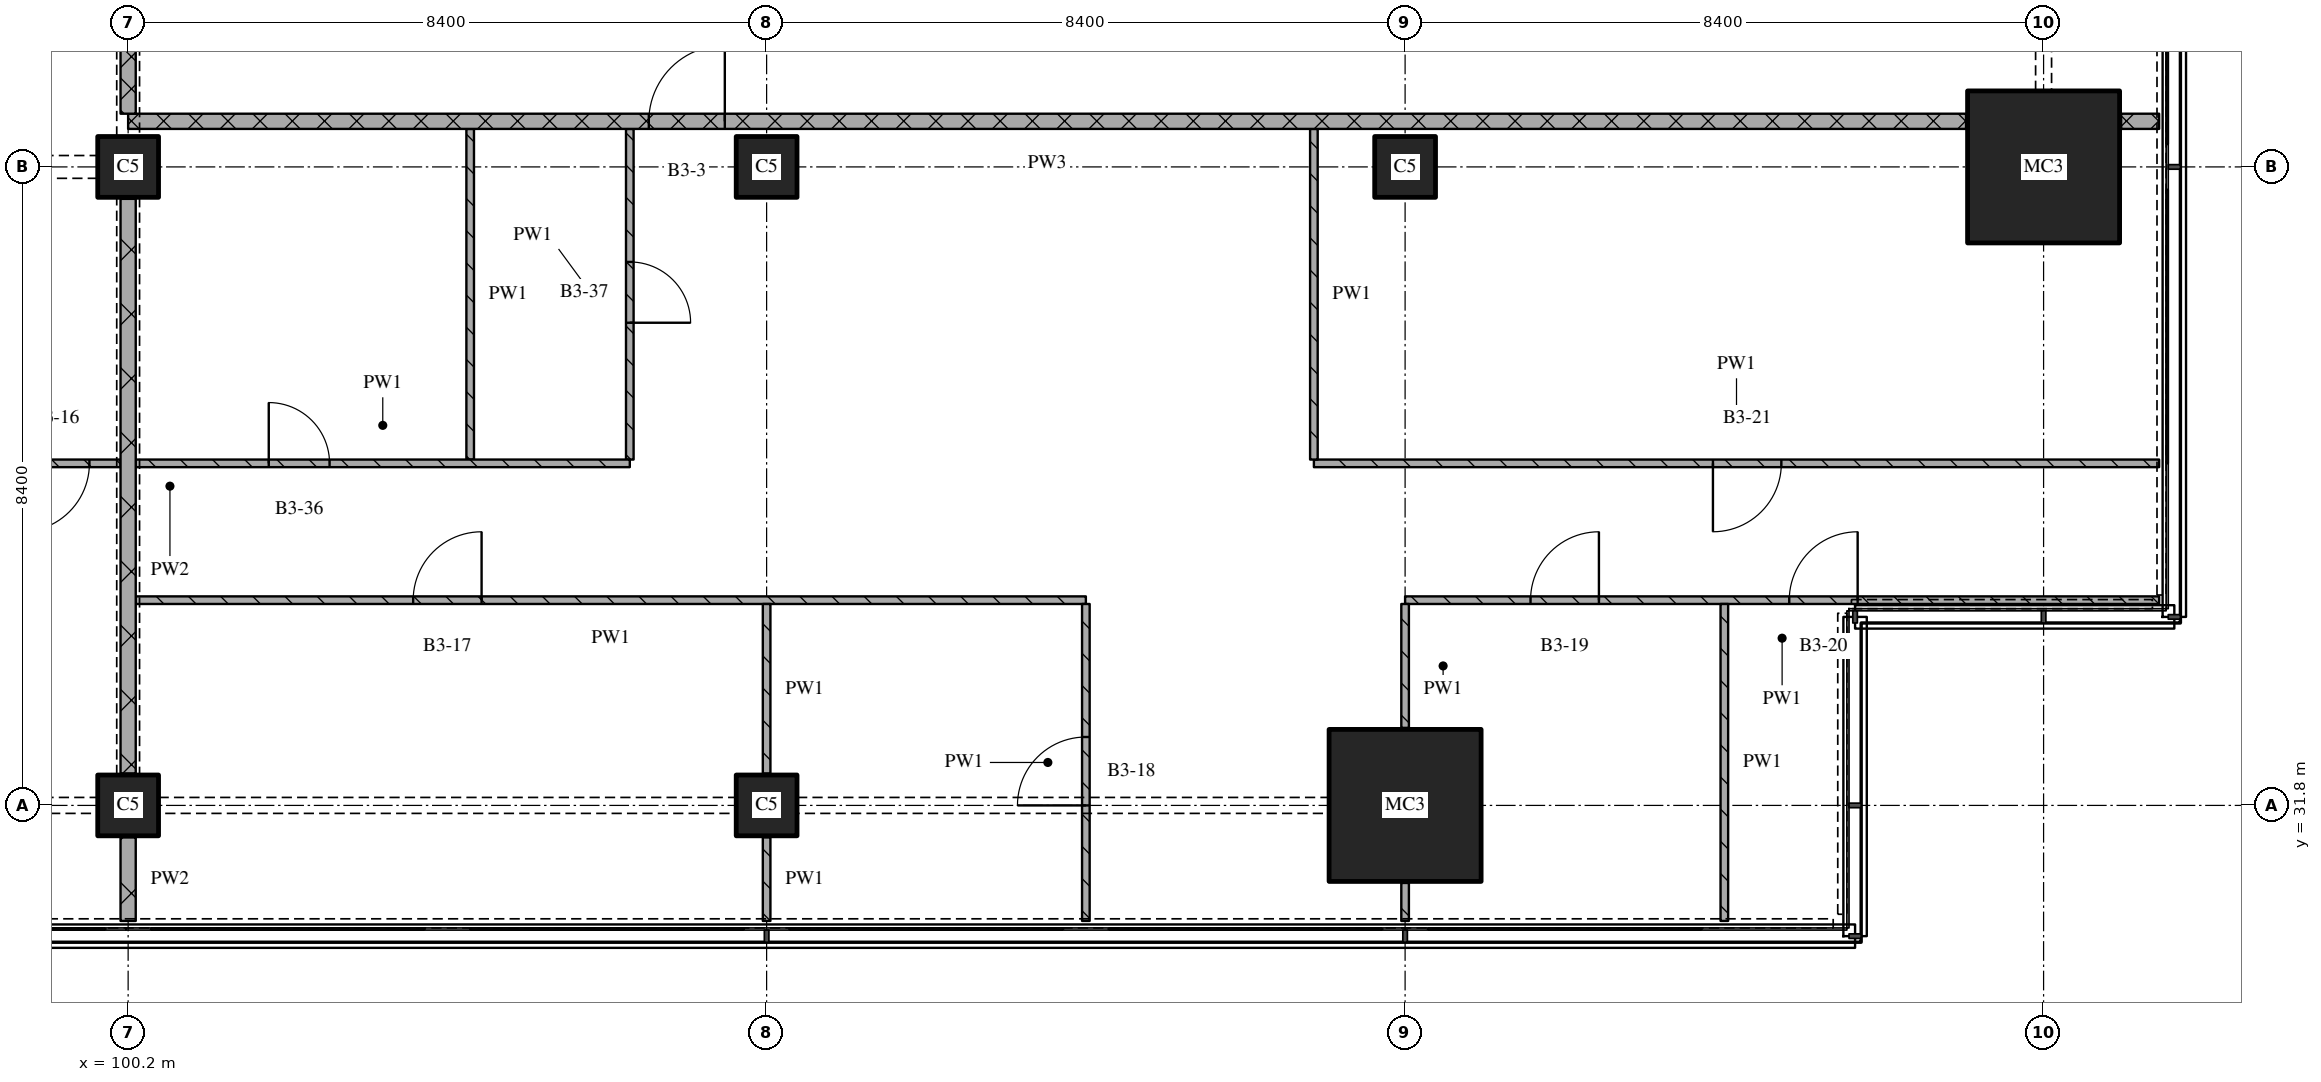
"""IFC4 building model, lengths in metres.
Left out: names, types, materials, properties, quantities, classifications, styles, units other than length and angle.
Written with IfcOpenShell. Run it as: python <this file> out.ifc"""

import sys

from ifc_helpers import new_model, si_unit, direction, frame, frame_2d, origin, origin_2d, place, context, subcontext, project, spatial, rectangle, extrude, element, fill, save


model = new_model("IFC4")
c1 = context("Model", 3, precision=1e-05, world=origin(), true_north=direction((0.0, 1.0)))
c2 = subcontext(c1, "Body", "Model", "MODEL_VIEW")
j1 = project(units=[si_unit("LENGTHUNIT", "METRE"), si_unit("PLANEANGLEUNIT", "RADIAN")], contexts=[c1])
p1 = place(None, origin())
s1 = spatial("IfcSite", under=j1, at=p1, CompositionType="ELEMENT")
p2 = place(p1, origin())
s2 = spatial("IfcBuilding", under=s1, at=p2, CompositionType="ELEMENT")
p3 = place(p2, frame((0.0, 0.0, 124.05)))
s3 = spatial("IfcBuildingStorey", under=s2, at=p3, CompositionType="ELEMENT", Elevation=124.05)
for number, where, z_axis, x_axis in (
    (1, (100.2, 31.8, 0.0), (0.0, 0.0, 1.0), (1.0, 0.0, 0.0)),
    (2, (100.2, 40.2, 0.0), (0.0, 0.0, 1.0), (1.0, 0.0, 0.0)),
    (3, (108.6, 31.8, 0.0), (0.0, 0.0, 1.0), (1.0, 0.0, 0.0)),
    (4, (108.6, 40.2, 0.0), (0.0, 0.0, 1.0), (1.0, 0.0, 0.0)),
):
    element("IfcColumn", number, at=place(p3, frame(where, z_axis=z_axis, x_axis=x_axis)), inside=s3, PredefinedType="COLUMN", context=c2, shape_type="SweptSolid", body=[
        extrude(rectangle(XDim=0.8, YDim=0.8, at=origin_2d()), origin(), (0.0, 0.0, 1.0), 3.6),
    ])
p4 = place(p3, frame((117.0, 31.8, 0.0), z_axis=(0.0, 0.0, 1.0), x_axis=(1.0, 0.0, 0.0)))
e5 = element("IfcColumn", 5, at=p4, inside=s3, PredefinedType="COLUMN", context=c2, shape_type="SweptSolid", body=[
    extrude(rectangle(XDim=2.0, YDim=2.0, at=origin_2d()), origin(), (0.0, 0.0, 1.0), 3.6),
])
p5 = place(p3, frame((117.0, 40.2, 0.0), z_axis=(0.0, 0.0, 1.0), x_axis=(1.0, 0.0, 0.0)))
e6 = element("IfcColumn", 6, at=p5, inside=s3, PredefinedType="COLUMN", context=c2, shape_type="SweptSolid", body=[
    extrude(rectangle(XDim=0.8, YDim=0.8, at=origin_2d()), origin(), (0.0, 0.0, 1.0), 3.6),
])
p6 = place(p3, frame((125.4, 40.2, 0.0), z_axis=(0.0, 0.0, 1.0), x_axis=(1.0, 0.0, 0.0)))
e7 = element("IfcColumn", 7, at=p6, inside=s3, PredefinedType="COLUMN", context=c2, shape_type="SweptSolid", body=[
    extrude(rectangle(XDim=2.0, YDim=2.0, at=origin_2d()), origin(), (0.0, 0.0, 1.0), 3.6),
])
p7 = place(p3, frame((112.8, 34.5, 0.0), z_axis=(0.0, 0.0, 1.0), x_axis=(-1.0, 0.0, 0.0)))
e8 = element("IfcWall", 8, at=p7, inside=s3, PredefinedType="PARTITIONING", context=c2, shape_type="SweptSolid", body=[
    extrude(rectangle(XDim=12.5, YDim=0.1, at=frame_2d((6.25, 0.0))), origin(), (0.0, 0.0, 1.0), 3.32),
])
p8 = place(p7, frame((7.95, 0.0, 0.0)))
e9 = element("IfcOpeningElement", 9, at=p8, cuts=e8, PredefinedType="OPENING", context=c2, shape_type="SweptSolid", body=[
    extrude(rectangle(XDim=0.9, YDim=2.1, at=frame_2d((0.45, 1.05))), frame((0.0, 0.06, 0.0), z_axis=(0.0, -1.0, 0.0), x_axis=(1.0, 0.0, 0.0)), (0.0, 0.0, 1.0), 0.12),
])
p9 = place(p3, frame((126.92, 34.5, 0.0), z_axis=(0.0, 0.0, 1.0), x_axis=(-1.0, 0.0, 0.0)))
e10 = element("IfcWall", 10, at=p9, inside=s3, PredefinedType="PARTITIONING", context=c2, shape_type="SweptSolid", body=[
    extrude(rectangle(XDim=9.92, YDim=0.1, at=frame_2d((4.96, 0.0))), origin(), (0.0, 0.0, 1.0), 3.32),
])
p10 = place(p9, frame((3.966, 0.0, 0.0)))
e11 = element("IfcOpeningElement", 11, at=p10, cuts=e10, PredefinedType="OPENING", context=c2, shape_type="SweptSolid", body=[
    extrude(rectangle(XDim=0.9, YDim=2.1, at=frame_2d((0.45, 1.05))), frame((0.0, 0.06, 0.0), z_axis=(0.0, -1.0, 0.0), x_axis=(1.0, 0.0, 0.0)), (0.0, 0.0, 1.0), 0.12),
])
p11 = place(p9, frame((7.37, 0.0, 0.0)))
e12 = element("IfcOpeningElement", 12, at=p11, cuts=e10, PredefinedType="OPENING", context=c2, shape_type="SweptSolid", body=[
    extrude(rectangle(XDim=0.9, YDim=2.1, at=frame_2d((0.45, 1.05))), frame((0.0, 0.06, 0.0), z_axis=(0.0, -1.0, 0.0), x_axis=(1.0, 0.0, 0.0)), (0.0, 0.0, 1.0), 0.12),
])
p12 = place(p3, frame((115.8, 36.3, 0.0), z_axis=(0.0, 0.0, 1.0), x_axis=(1.0, 0.0, 0.0)))
e13 = element("IfcWall", 13, at=p12, inside=s3, PredefinedType="PARTITIONING", context=c2, shape_type="SweptSolid", body=[
    extrude(rectangle(XDim=11.12, YDim=0.1, at=frame_2d((5.56, 0.0))), origin(), (0.0, 0.0, 1.0), 3.32),
])
p13 = place(p12, frame((5.25, 0.0, 0.0)))
e14 = element("IfcOpeningElement", 14, at=p13, cuts=e13, PredefinedType="OPENING", context=c2, shape_type="SweptSolid", body=[
    extrude(rectangle(XDim=0.9, YDim=2.1, at=frame_2d((0.45, 1.05))), frame((0.0, 0.06, 0.0), z_axis=(0.0, -1.0, 0.0), x_axis=(1.0, 0.0, 0.0)), (0.0, 0.0, 1.0), 0.12),
])
p14 = place(p3, frame((124.38, 40.8, 0.0), z_axis=(0.0, 0.0, 1.0), x_axis=(-1.0, 0.0, 0.0)))
e15 = element("IfcWall", 15, at=p14, inside=s3, PredefinedType="PARTITIONING", context=c2, shape_type="SweptSolid", body=[
    extrude(rectangle(XDim=24.18, YDim=0.2, at=frame_2d((12.09, 0.0))), origin(), (0.0, 0.0, 1.0), 3.32),
])
p15 = place(p14, frame((16.33, 0.0, 0.0)))
e16 = element("IfcOpeningElement", 16, at=p15, cuts=e15, PredefinedType="OPENING", context=c2, shape_type="SweptSolid", body=[
    extrude(rectangle(XDim=1.0, YDim=2.1, at=frame_2d((0.5, 1.05))), frame((0.0, 0.11, 0.0), z_axis=(0.0, -1.0, 0.0), x_axis=(1.0, 0.0, 0.0)), (0.0, 0.0, 1.0), 0.22),
])
p16 = place(p3, frame((126.42, 40.8, 0.0), z_axis=(0.0, 0.0, 1.0), x_axis=(1.0, 0.0, 0.0)))
e17 = element("IfcWall", 17, at=p16, inside=s3, PredefinedType="PARTITIONING", context=c2, shape_type="SweptSolid", body=[
    extrude(rectangle(XDim=0.5, YDim=0.2, at=frame_2d((0.25, 0.0))), origin(), (0.0, 0.0, 1.0), 3.32),
])
p17 = place(p3, frame((100.2, 43.1, 0.0), z_axis=(0.0, 0.0, 1.0), x_axis=(0.0, -1.0, 0.0)))
e18 = element("IfcWall", 18, at=p17, inside=s3, PredefinedType="PARTITIONING", context=c2, shape_type="SweptSolid", body=[
    extrude(rectangle(XDim=2.2, YDim=0.2, at=frame_2d((1.1, 0.0))), origin(), (0.0, 0.0, 1.0), 2.43),
])
p18 = place(p3, frame((100.2, 31.38, 0.0), z_axis=(0.0, 0.0, 1.0), x_axis=(0.0, -1.0, 0.0)))
e19 = element("IfcWall", 19, at=p18, inside=s3, PredefinedType="PARTITIONING", context=c2, shape_type="SweptSolid", body=[
    extrude(rectangle(XDim=1.1, YDim=0.2, at=frame_2d((0.55, 0.0))), origin(), (0.0, 0.0, 1.0), 3.32),
])
p19 = place(p3, frame((100.2, 39.78, 0.0), z_axis=(0.0, 0.0, 1.0), x_axis=(0.0, -1.0, 0.0)))
e20 = element("IfcWall", 20, at=p19, inside=s3, PredefinedType="PARTITIONING", context=c2, shape_type="SweptSolid", body=[
    extrude(rectangle(XDim=7.56, YDim=0.2, at=frame_2d((3.78, 0.0))), origin(), (0.0, 0.0, 1.0), 2.83),
])
p20 = place(p3, frame((104.7, 40.7, 0.0), z_axis=(0.0, 0.0, 1.0), x_axis=(0.0, -1.0, 0.0)))
e21 = element("IfcWall", 21, at=p20, inside=s3, PredefinedType="PARTITIONING", context=c2, shape_type="SweptSolid", body=[
    extrude(rectangle(XDim=4.35, YDim=0.1, at=frame_2d((2.175, 0.0))), origin(), (0.0, 0.0, 1.0), 3.32),
])
p21 = place(p3, frame((106.8, 36.35, 0.0), z_axis=(0.0, 0.0, 1.0), x_axis=(0.0, 1.0, 0.0)))
e22 = element("IfcWall", 22, at=p21, inside=s3, PredefinedType="PARTITIONING", context=c2, shape_type="SweptSolid", body=[
    extrude(rectangle(XDim=4.35, YDim=0.1, at=frame_2d((2.175, 0.0))), origin(), (0.0, 0.0, 1.0), 3.32),
])
p22 = place(p21, frame((1.8, 0.0, 0.0)))
e23 = element("IfcOpeningElement", 23, at=p22, cuts=e22, PredefinedType="OPENING", context=c2, shape_type="SweptSolid", body=[
    extrude(rectangle(XDim=0.8, YDim=2.1, at=frame_2d((0.4, 1.05))), frame((0.0, 0.06, 0.0), z_axis=(0.0, -1.0, 0.0), x_axis=(1.0, 0.0, 0.0)), (0.0, 0.0, 1.0), 0.12),
])
p23 = place(p3, frame((108.6, 31.38, 0.0), z_axis=(0.0, 0.0, 1.0), x_axis=(0.0, -1.0, 0.0)))
e24 = element("IfcWall", 24, at=p23, inside=s3, PredefinedType="PARTITIONING", context=c2, shape_type="SweptSolid", body=[
    extrude(rectangle(XDim=1.1, YDim=0.1, at=frame_2d((0.55, 0.0))), origin(), (0.0, 0.0, 1.0), 3.32),
])
p24 = place(p3, frame((108.6, 34.45, 0.0), z_axis=(0.0, 0.0, 1.0), x_axis=(0.0, -1.0, 0.0)))
e25 = element("IfcWall", 25, at=p24, inside=s3, PredefinedType="PARTITIONING", context=c2, shape_type="SweptSolid", body=[
    extrude(rectangle(XDim=2.23, YDim=0.1, at=frame_2d((1.115, 0.0))), origin(), (0.0, 0.0, 1.0), 3.32),
])
p25 = place(p3, frame((112.8, 30.28, 0.0), z_axis=(0.0, 0.0, 1.0), x_axis=(0.0, 1.0, 0.0)))
e26 = element("IfcWall", 26, at=p25, inside=s3, PredefinedType="PARTITIONING", context=c2, shape_type="SweptSolid", body=[
    extrude(rectangle(XDim=4.17, YDim=0.1, at=frame_2d((2.085, 0.0))), origin(), (0.0, 0.0, 1.0), 3.32),
])
p26 = place(p25, frame((1.52, 0.0, 0.0)))
e27 = element("IfcOpeningElement", 27, at=p26, cuts=e26, PredefinedType="OPENING", context=c2, shape_type="SweptSolid", body=[
    extrude(rectangle(XDim=0.9, YDim=2.1, at=frame_2d((0.45, 1.05))), frame((0.0, 0.06, 0.0), z_axis=(0.0, -1.0, 0.0), x_axis=(1.0, 0.0, 0.0)), (0.0, 0.0, 1.0), 0.12),
])
p27 = place(p3, frame((115.8, 40.7, 0.0), z_axis=(0.0, 0.0, 1.0), x_axis=(0.0, -1.0, 0.0)))
e28 = element("IfcWall", 28, at=p27, inside=s3, PredefinedType="PARTITIONING", context=c2, shape_type="SweptSolid", body=[
    extrude(rectangle(XDim=4.35, YDim=0.1, at=frame_2d((2.175, 0.0))), origin(), (0.0, 0.0, 1.0), 3.32),
])
p28 = place(p3, frame((117.0, 30.78, 0.0), z_axis=(0.0, 0.0, 1.0), x_axis=(0.0, -1.0, 0.0)))
e29 = element("IfcWall", 29, at=p28, inside=s3, PredefinedType="PARTITIONING", context=c2, shape_type="SweptSolid", body=[
    extrude(rectangle(XDim=0.5, YDim=0.1, at=frame_2d((0.25, 0.0))), origin(), (0.0, 0.0, 1.0), 3.32),
])
p29 = place(p3, frame((117.0, 34.45, 0.0), z_axis=(0.0, 0.0, 1.0), x_axis=(0.0, -1.0, 0.0)))
e30 = element("IfcWall", 30, at=p29, inside=s3, PredefinedType="PARTITIONING", context=c2, shape_type="SweptSolid", body=[
    extrude(rectangle(XDim=1.63, YDim=0.1, at=frame_2d((0.815, 0.0))), origin(), (0.0, 0.0, 1.0), 3.32),
])
p30 = place(p3, frame((121.2, 34.45, 0.0), z_axis=(0.0, 0.0, 1.0), x_axis=(0.0, -1.0, 0.0)))
e31 = element("IfcWall", 31, at=p30, inside=s3, PredefinedType="PARTITIONING", context=c2, shape_type="SweptSolid", body=[
    extrude(rectangle(XDim=4.17, YDim=0.1, at=frame_2d((2.085, 0.0))), origin(), (0.0, 0.0, 1.0), 3.32),
])
p31 = place(p3, frame((90.6, 36.3, 0.0), z_axis=(0.0, 0.0, 1.0), x_axis=(1.0, 0.0, 0.0)))
e32 = element("IfcWall", 32, at=p31, inside=s3, PredefinedType="PARTITIONING", context=c2, shape_type="SweptSolid", body=[
    extrude(rectangle(XDim=9.5, YDim=0.1, at=frame_2d((4.75, 0.0))), origin(), (0.0, 0.0, 1.0), 3.32),
])
p32 = place(p31, frame((5.361, 0.0, 0.0)))
e33 = element("IfcOpeningElement", 33, at=p32, cuts=e32, PredefinedType="OPENING", context=c2, shape_type="SweptSolid", body=[
    extrude(rectangle(XDim=0.8, YDim=2.1, at=frame_2d((0.4, 1.05))), frame((0.0, 0.06, 0.0), z_axis=(0.0, -1.0, 0.0), x_axis=(1.0, 0.0, 0.0)), (0.0, 0.0, 1.0), 0.12),
])
p33 = place(p31, frame((8.191, 0.0, 0.0)))
e34 = element("IfcOpeningElement", 34, at=p33, cuts=e32, PredefinedType="OPENING", context=c2, shape_type="SweptSolid", body=[
    extrude(rectangle(XDim=0.9, YDim=2.1, at=frame_2d((0.45, 1.05))), frame((0.0, 0.06, 0.0), z_axis=(0.0, -1.0, 0.0), x_axis=(1.0, 0.0, 0.0)), (0.0, 0.0, 1.0), 0.12),
])
p34 = place(p3, frame((100.3, 36.3, 0.0), z_axis=(0.0, 0.0, 1.0), x_axis=(1.0, 0.0, 0.0)))
e35 = element("IfcWall", 35, at=p34, inside=s3, PredefinedType="PARTITIONING", context=c2, shape_type="SweptSolid", body=[
    extrude(rectangle(XDim=6.5, YDim=0.1, at=frame_2d((3.25, 0.0))), origin(), (0.0, 0.0, 1.0), 3.32),
])
p35 = place(p34, frame((1.75, 0.0, 0.0)))
e36 = element("IfcOpeningElement", 36, at=p35, cuts=e35, PredefinedType="OPENING", context=c2, shape_type="SweptSolid", body=[
    extrude(rectangle(XDim=0.8, YDim=2.1, at=frame_2d((0.4, 1.05))), frame((0.0, 0.06, 0.0), z_axis=(0.0, -1.0, 0.0), x_axis=(1.0, 0.0, 0.0)), (0.0, 0.0, 1.0), 0.12),
])
p36 = place(p8, origin())
e37 = element("IfcDoor", 37, at=p36, inside=s3, OperationType="SINGLE_SWING_RIGHT", PredefinedType="DOOR", context=c2, shape_type="SweptSolid", body=[
    extrude(rectangle(XDim=0.9, YDim=2.1, at=frame_2d((0.45, 1.05))), frame((0.0, 0.025, 0.0), z_axis=(0.0, -1.0, 0.0), x_axis=(1.0, 0.0, 0.0)), (0.0, 0.0, 1.0), 0.05),
])
fill(e9, e37)
p37 = place(p10, origin())
e38 = element("IfcDoor", 38, at=p37, inside=s3, OperationType="SINGLE_SWING_RIGHT", PredefinedType="DOOR", context=c2, shape_type="SweptSolid", body=[
    extrude(rectangle(XDim=0.9, YDim=2.1, at=frame_2d((0.45, 1.05))), frame((0.0, 0.025, 0.0), z_axis=(0.0, -1.0, 0.0), x_axis=(1.0, 0.0, 0.0)), (0.0, 0.0, 1.0), 0.05),
])
fill(e11, e38)
p38 = place(p11, origin())
e39 = element("IfcDoor", 39, at=p38, inside=s3, OperationType="SINGLE_SWING_RIGHT", PredefinedType="DOOR", context=c2, shape_type="SweptSolid", body=[
    extrude(rectangle(XDim=0.9, YDim=2.1, at=frame_2d((0.45, 1.05))), frame((0.0, 0.025, 0.0), z_axis=(0.0, -1.0, 0.0), x_axis=(1.0, 0.0, 0.0)), (0.0, 0.0, 1.0), 0.05),
])
fill(e12, e39)
p39 = place(p13, origin())
e40 = element("IfcDoor", 40, at=p39, inside=s3, OperationType="SINGLE_SWING_RIGHT", PredefinedType="DOOR", context=c2, shape_type="SweptSolid", body=[
    extrude(rectangle(XDim=0.9, YDim=2.1, at=frame_2d((0.45, 1.05))), frame((0.0, 0.025, 0.0), z_axis=(0.0, -1.0, 0.0), x_axis=(1.0, 0.0, 0.0)), (0.0, 0.0, 1.0), 0.05),
])
fill(e14, e40)
p40 = place(p15, origin())
e41 = element("IfcDoor", 41, at=p40, inside=s3, OperationType="SINGLE_SWING_RIGHT", PredefinedType="DOOR", context=c2, shape_type="SweptSolid", body=[
    extrude(rectangle(XDim=1.0, YDim=2.1, at=frame_2d((0.5, 1.05))), frame((0.0, 0.025, 0.0), z_axis=(0.0, -1.0, 0.0), x_axis=(1.0, 0.0, 0.0)), (0.0, 0.0, 1.0), 0.05),
])
fill(e16, e41)
p41 = place(p22, origin())
e42 = element("IfcDoor", 42, at=p41, inside=s3, OperationType="SINGLE_SWING_RIGHT", PredefinedType="DOOR", context=c2, shape_type="SweptSolid", body=[
    extrude(rectangle(XDim=0.8, YDim=2.1, at=frame_2d((0.4, 1.05))), frame((0.0, 0.025, 0.0), z_axis=(0.0, -1.0, 0.0), x_axis=(1.0, 0.0, 0.0)), (0.0, 0.0, 1.0), 0.05),
])
fill(e23, e42)
p42 = place(p26, origin())
e43 = element("IfcDoor", 43, at=p42, inside=s3, OperationType="SINGLE_SWING_LEFT", PredefinedType="DOOR", context=c2, shape_type="SweptSolid", body=[
    extrude(rectangle(XDim=0.9, YDim=2.1, at=frame_2d((0.45, 1.05))), frame((0.0, 0.025, 0.0), z_axis=(0.0, -1.0, 0.0), x_axis=(1.0, 0.0, 0.0)), (0.0, 0.0, 1.0), 0.05),
])
fill(e27, e43)
p43 = place(p33, origin())
e44 = element("IfcDoor", 44, at=p43, inside=s3, OperationType="SINGLE_SWING_RIGHT", PredefinedType="DOOR", context=c2, shape_type="SweptSolid", body=[
    extrude(rectangle(XDim=0.9, YDim=2.1, at=frame_2d((0.45, 1.05))), frame((0.0, 0.025, 0.0), z_axis=(0.0, -1.0, 0.0), x_axis=(1.0, 0.0, 0.0)), (0.0, 0.0, 1.0), 0.05),
])
fill(e34, e44)
p44 = place(p35, origin())
e45 = element("IfcDoor", 45, at=p44, inside=s3, OperationType="SINGLE_SWING_LEFT", PredefinedType="DOOR", context=c2, shape_type="SweptSolid", body=[
    extrude(rectangle(XDim=0.8, YDim=2.1, at=frame_2d((0.4, 1.05))), frame((0.0, 0.025, 0.0), z_axis=(0.0, -1.0, 0.0), x_axis=(1.0, 0.0, 0.0)), (0.0, 0.0, 1.0), 0.05),
])
fill(e36, e45)
save(model, sys.argv[1])
